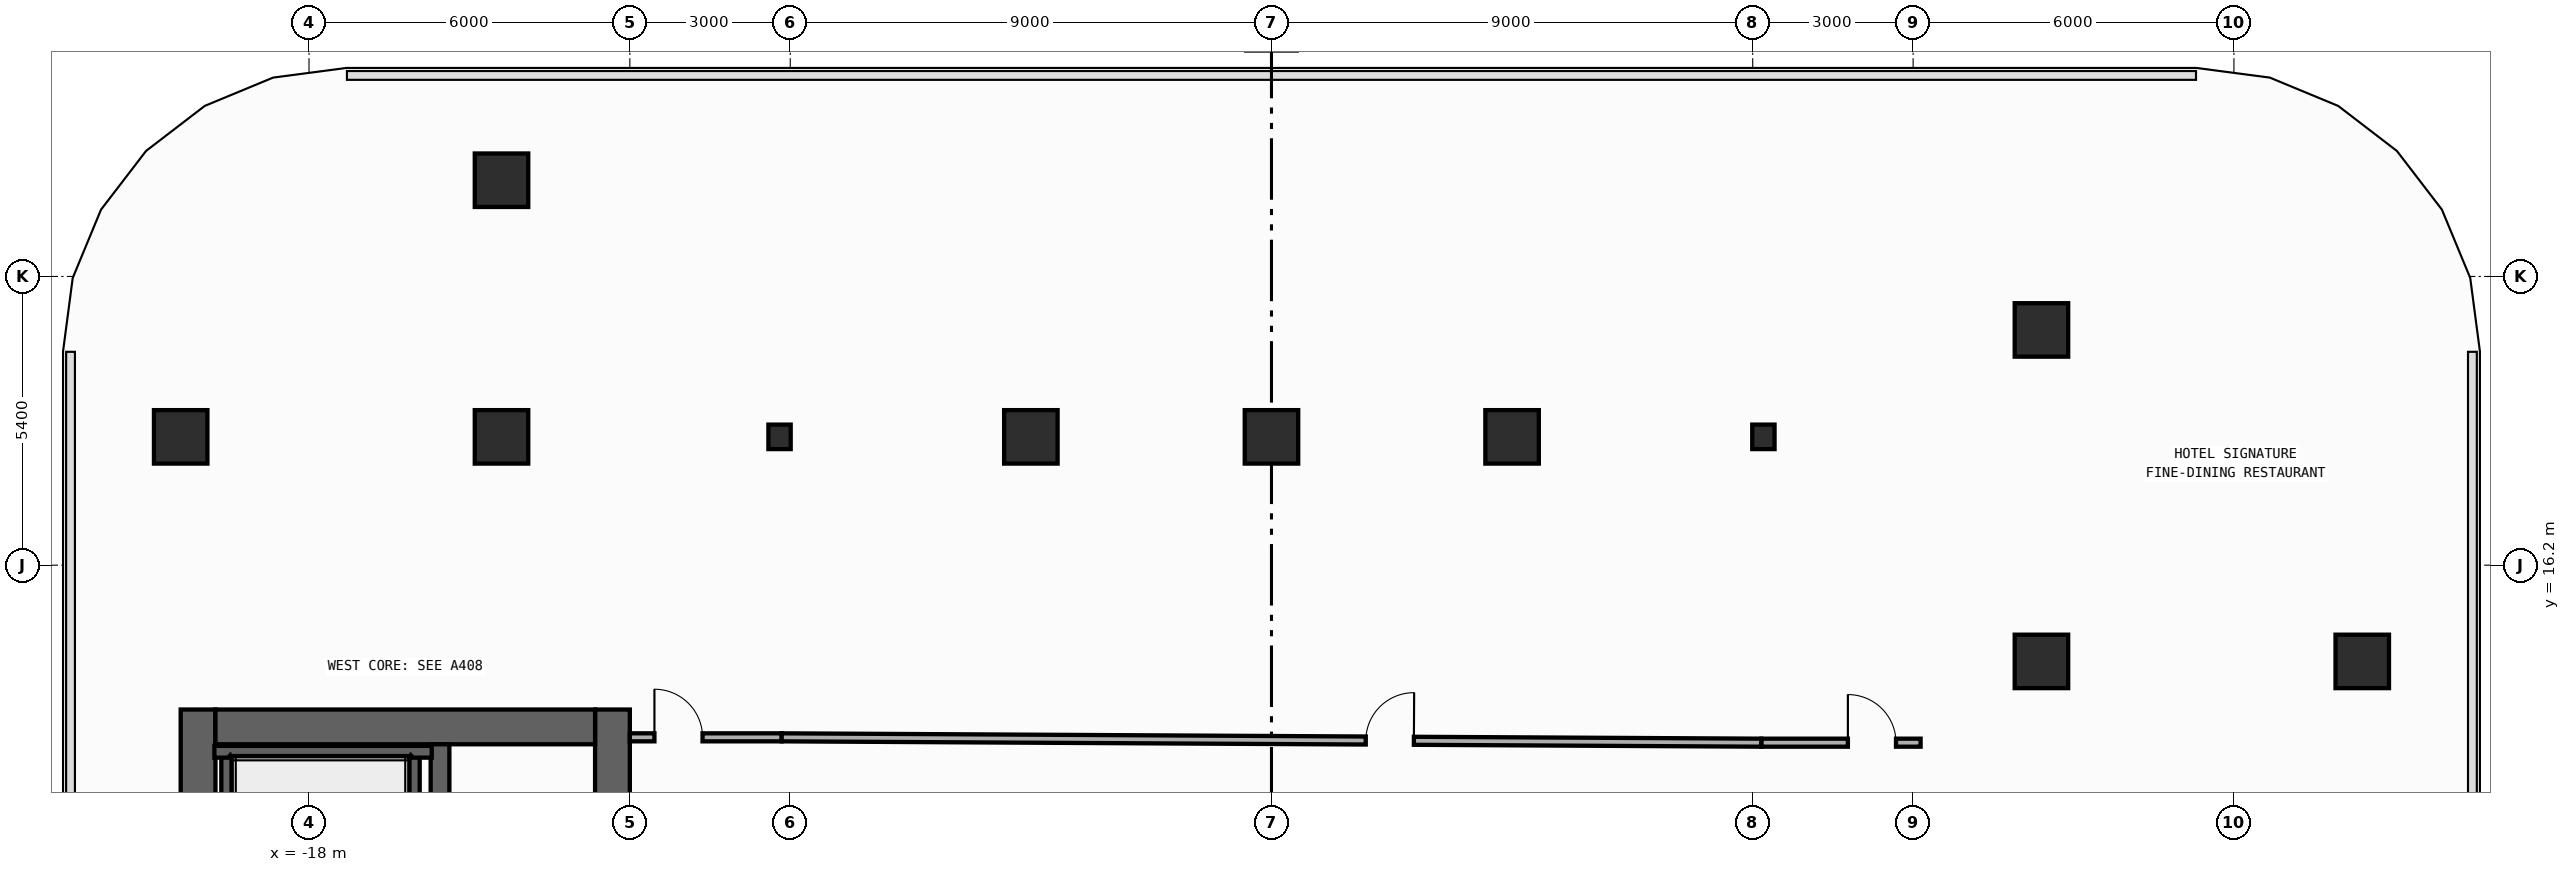
"""IFC4 building model, lengths in metres.
Left out: names, types, materials, properties, quantities, classifications, styles, units other than length and angle.
Written with IfcOpenShell. Run it as: python <this file> out.ifc"""

import sys

from ifc_helpers import new_model, si_unit, direction, frame, frame_2d, origin, origin_2d, place, context, subcontext, project, spatial, rectangle, i_section, extrude, element, fill, save


model = new_model("IFC4")
c1 = context("Model", 3, precision=1e-05, world=origin(), true_north=direction((0.0, 1.0)))
c2 = subcontext(c1, "Body", "Model", "MODEL_VIEW")
j1 = project(units=[si_unit("LENGTHUNIT", "METRE"), si_unit("PLANEANGLEUNIT", "RADIAN")], contexts=[c1])
p1 = place(None, origin())
s1 = spatial("IfcSite", under=j1, at=p1, CompositionType="ELEMENT")
p2 = place(p1, origin())
s2 = spatial("IfcBuilding", under=s1, at=p2, CompositionType="ELEMENT")
p3 = place(p2, frame((0.0, 0.0, 160.4)))
s3 = spatial("IfcBuildingStorey", under=s2, at=p3, CompositionType="ELEMENT", Elevation=160.4)
p4 = place(p3, frame((-20.075, -13.5, 0.0), z_axis=(0.0, 0.0, 1.0), x_axis=(0.0, 1.0, 0.0)))
e1 = element("IfcWall", 1, at=p4, inside=s3, PredefinedType="SHEAR", context=c2, shape_type="SweptSolid", body=[
    extrude(rectangle(XDim=27.0, YDim=0.65, at=frame_2d((13.5, 0.0))), origin(), (0.0, 0.0, 1.0), 4.34),
])
p5 = place(p3, frame((-12.325, -13.5, 0.0), z_axis=(0.0, 0.0, 1.0), x_axis=(0.0, 1.0, 0.0)))
e2 = element("IfcWall", 2, at=p5, inside=s3, PredefinedType="SHEAR", context=c2, shape_type="SweptSolid", body=[
    extrude(rectangle(XDim=27.0, YDim=0.65, at=frame_2d((13.5, 0.0))), origin(), (0.0, 0.0, 1.0), 4.34),
])
p6 = place(p5, frame((10.35, 0.0, 0.0)))
e3 = element("IfcOpeningElement", 3, at=p6, cuts=e2, PredefinedType="OPENING", context=c2, shape_type="SweptSolid", body=[
    extrude(rectangle(XDim=1.1, YDim=2.2, at=frame_2d((0.55, 1.1))), frame((0.0, 0.335, 0.0), z_axis=(0.0, -1.0, 0.0), x_axis=(1.0, 0.0, 0.0)), (0.0, 0.0, 1.0), 0.67),
])
p7 = place(p5, frame((7.15, 0.0, 0.0)))
e4 = element("IfcOpeningElement", 4, at=p7, cuts=e2, PredefinedType="OPENING", context=c2, shape_type="SweptSolid", body=[
    extrude(rectangle(XDim=1.1, YDim=2.2, at=frame_2d((0.55, 1.1))), frame((0.0, 0.335, 0.0), z_axis=(0.0, -1.0, 0.0), x_axis=(1.0, 0.0, 0.0)), (0.0, 0.0, 1.0), 0.67),
])
p8 = place(p5, frame((3.95, 0.0, 0.0)))
e5 = element("IfcOpeningElement", 5, at=p8, cuts=e2, PredefinedType="OPENING", context=c2, shape_type="SweptSolid", body=[
    extrude(rectangle(XDim=1.1, YDim=2.2, at=frame_2d((0.55, 1.1))), frame((0.0, 0.335, 0.0), z_axis=(0.0, -1.0, 0.0), x_axis=(1.0, 0.0, 0.0)), (0.0, 0.0, 1.0), 0.67),
])
p9 = place(p5, frame((15.175, 0.0, 0.0)))
e6 = element("IfcOpeningElement", 6, at=p9, cuts=e2, PredefinedType="OPENING", context=c2, shape_type="SweptSolid", body=[
    extrude(rectangle(XDim=0.85, YDim=2.1, at=frame_2d((0.425, 1.05))), frame((0.0, 0.335, 0.0), z_axis=(0.0, -1.0, 0.0), x_axis=(1.0, 0.0, 0.0)), (0.0, 0.0, 1.0), 0.67),
])
p10 = place(p5, frame((21.275, 0.0, 0.0)))
e7 = element("IfcOpeningElement", 7, at=p10, cuts=e2, PredefinedType="OPENING", context=c2, shape_type="SweptSolid", body=[
    extrude(rectangle(XDim=0.85, YDim=2.1, at=frame_2d((0.425, 1.05))), frame((0.0, 0.335, 0.0), z_axis=(0.0, -1.0, 0.0), x_axis=(1.0, 0.0, 0.0)), (0.0, 0.0, 1.0), 0.67),
])
p11 = place(p5, frame((12.725, 0.0, 0.0)))
e8 = element("IfcOpeningElement", 8, at=p11, cuts=e2, PredefinedType="OPENING", context=c2, shape_type="SweptSolid", body=[
    extrude(rectangle(XDim=1.15, YDim=2.2, at=frame_2d((0.575, 1.1))), frame((0.0, 0.335, 0.0), z_axis=(0.0, -1.0, 0.0), x_axis=(1.0, 0.0, 0.0)), (0.0, 0.0, 1.0), 0.67),
])
p12 = place(p5, frame((1.625, 0.0, 0.0)))
e9 = element("IfcOpeningElement", 9, at=p12, cuts=e2, PredefinedType="OPENING", context=c2, shape_type="SweptSolid", body=[
    extrude(rectangle(XDim=0.85, YDim=2.1, at=frame_2d((0.425, 1.05))), frame((0.0, 0.335, 0.0), z_axis=(0.0, -1.0, 0.0), x_axis=(1.0, 0.0, 0.0)), (0.0, 0.0, 1.0), 0.67),
])
p13 = place(p3, frame((-19.75, 13.175, 0.0), z_axis=(0.0, 0.0, 1.0), x_axis=(1.0, 0.0, 0.0)))
e10 = element("IfcWall", 10, at=p13, inside=s3, PredefinedType="SHEAR", context=c2, shape_type="SweptSolid", body=[
    extrude(rectangle(XDim=7.1, YDim=0.65, at=frame_2d((3.55, 0.0))), origin(), (0.0, 0.0, 1.0), 4.34),
])
p14 = place(p3, frame((-15.55, -12.85, 0.0), z_axis=(0.0, 0.0, 1.0), x_axis=(0.0, 1.0, 0.0)))
e11 = element("IfcWall", 11, at=p14, inside=s3, PredefinedType="SHEAR", context=c2, shape_type="SweptSolid", body=[
    extrude(rectangle(XDim=25.7, YDim=0.35, at=frame_2d((12.85, 0.0))), origin(), (0.0, 0.0, 1.0), 4.34),
])
p15 = place(p14, frame((12.075, 0.0, 0.0)))
e12 = element("IfcOpeningElement", 12, at=p15, cuts=e11, PredefinedType="OPENING", context=c2, shape_type="SweptSolid", body=[
    extrude(rectangle(XDim=1.15, YDim=2.2, at=frame_2d((0.575, 1.1))), frame((0.0, 0.185, 0.0), z_axis=(0.0, -1.0, 0.0), x_axis=(1.0, 0.0, 0.0)), (0.0, 0.0, 1.0), 0.37),
])
p16 = place(p14, frame((0.975, 0.0, 0.0)))
e13 = element("IfcOpeningElement", 13, at=p16, cuts=e11, PredefinedType="OPENING", context=c2, shape_type="SweptSolid", body=[
    extrude(rectangle(XDim=0.85, YDim=2.1, at=frame_2d((0.425, 1.05))), frame((0.0, 0.185, 0.0), z_axis=(0.0, -1.0, 0.0), x_axis=(1.0, 0.0, 0.0)), (0.0, 0.0, 1.0), 0.37),
])
for number, where, z_axis, x_axis in (
    (14, (-16.04, 1.29, 0.0), (0.0, 0.0, 1.0), (0.0, 1.0, 0.0)),
    (15, (-19.53, 1.29, 0.0), (0.0, 0.0, 1.0), (0.0, 1.0, 0.0)),
):
    element("IfcWall", number, at=place(p3, frame(where, z_axis=z_axis, x_axis=x_axis)), inside=s3, PredefinedType="SHEAR", context=c2, shape_type="SweptSolid", body=[
        extrude(rectangle(XDim=11.42, YDim=0.22, at=frame_2d((5.71, 0.0))), origin(), (0.0, 0.0, 1.0), 4.34),
    ])
p17 = place(p3, frame((-19.77, 12.71, 0.0), z_axis=(0.0, 0.0, 1.0), x_axis=(1.0, 0.0, 0.0)))
e16 = element("IfcWall", 16, at=p17, inside=s3, PredefinedType="SHEAR", context=c2, shape_type="SweptSolid", body=[
    extrude(rectangle(XDim=4.065, YDim=0.22, at=frame_2d((2.032, 0.0))), origin(), (0.0, 0.0, 1.0), 4.34),
])
for number, where, z_axis, x_axis in (
    (17, (-9.2, 18.6, 0.0), (0.0, 0.0, 1.0), (1.0, 0.0, 0.0)),
    (18, (9.2, 18.6, 0.0), (0.0, 0.0, 1.0), (1.0, 0.0, 0.0)),
):
    element("IfcColumn", number, at=place(p3, frame(where, z_axis=z_axis, x_axis=x_axis)), inside=s3, PredefinedType="COLUMN", context=c2, shape_type="SweptSolid", body=[
        extrude(i_section(OverallWidth=0.417, OverallDepth=0.458, WebThickness=0.03, FlangeThickness=0.05, FilletRadius=0.022, at=origin_2d()), origin(), (0.0, 0.0, 1.0), 4.6),
    ])
for number, where, z_axis, x_axis in (
    (19, (-20.4, 18.6, 0.0), (0.0, 0.0, 1.0), (1.0, 0.0, 0.0)),
    (20, (20.4, 14.4, 0.0), (0.0, 0.0, 1.0), (1.0, 0.0, 0.0)),
    (21, (-14.4, 18.6, 0.0), (0.0, 0.0, 1.0), (1.0, 0.0, 0.0)),
    (22, (14.4, 14.4, 0.0), (0.0, 0.0, 1.0), (1.0, 0.0, 0.0)),
    (23, (-4.5, 18.6, 0.0), (0.0, 0.0, 1.0), (1.0, 0.0, 0.0)),
    (24, (0.0, 18.6, 0.0), (0.0, 0.0, 1.0), (1.0, 0.0, 0.0)),
    (25, (4.5, 18.6, 0.0), (0.0, 0.0, 1.0), (1.0, 0.0, 0.0)),
    (26, (-14.4, 23.4, 0.0), (0.0, 0.0, 1.0), (1.0, 0.0, 0.0)),
    (27, (14.4, 20.6, 0.0), (0.0, 0.0, 1.0), (1.0, 0.0, 0.0)),
):
    element("IfcColumn", number, at=place(p3, frame(where, z_axis=z_axis, x_axis=x_axis)), inside=s3, PredefinedType="COLUMN", context=c2, shape_type="SweptSolid", body=[
        extrude(rectangle(XDim=1.0, YDim=1.0, at=origin_2d()), origin(), (0.0, 0.0, 1.0), 4.6),
    ])
p18 = place(p3, frame((-12.0, 12.98, 0.0), z_axis=(0.0, 0.0, 1.0), x_axis=(1.0, 0.0, 0.0)))
e28 = element("IfcWall", 28, at=p18, inside=s3, PredefinedType="PARTITIONING", context=c2, shape_type="SweptSolid", body=[
    extrude(rectangle(XDim=2.84, YDim=0.15, at=frame_2d((1.42, 0.0))), origin(), (0.0, 0.0, 1.0), 4.34),
])
p19 = place(p18, frame((0.46, 0.0, 0.0)))
e29 = element("IfcOpeningElement", 29, at=p19, cuts=e28, PredefinedType="OPENING", context=c2, shape_type="SweptSolid", body=[
    extrude(rectangle(XDim=0.9, YDim=2.15, at=frame_2d((0.45, 1.075))), frame((0.0, 0.085, 0.0), z_axis=(0.0, -1.0, 0.0), x_axis=(1.0, 0.0, 0.0)), (0.0, 0.0, 1.0), 0.17),
])
p20 = place(p3, frame((9.16, 12.88, 0.0), z_axis=(0.0, 0.0, 1.0), x_axis=(1.0, 0.0, 0.0)))
e30 = element("IfcWall", 30, at=p20, inside=s3, PredefinedType="PARTITIONING", context=c2, shape_type="SweptSolid", body=[
    extrude(rectangle(XDim=2.98, YDim=0.15, at=frame_2d((1.49, 0.0))), origin(), (0.0, 0.0, 1.0), 4.34),
])
p21 = place(p20, frame((1.62, 0.0, 0.0)))
e31 = element("IfcOpeningElement", 31, at=p21, cuts=e30, PredefinedType="OPENING", context=c2, shape_type="SweptSolid", body=[
    extrude(rectangle(XDim=0.9, YDim=2.15, at=frame_2d((0.45, 1.075))), frame((0.0, 0.085, 0.0), z_axis=(0.0, -1.0, 0.0), x_axis=(1.0, 0.0, 0.0)), (0.0, 0.0, 1.0), 0.17),
])
p22 = place(p3, frame((-9.16, 12.98, 0.0), z_axis=(0.0, 0.0, 1.0), x_axis=(0.999985073242, -0.005463816733, 0.0)))
e32 = element("IfcWall", 32, at=p22, inside=s3, PredefinedType="PARTITIONING", context=c2, shape_type="SweptSolid", body=[
    extrude(rectangle(XDim=18.32, YDim=0.15, at=frame_2d((9.16, 0.0))), origin(), (0.0, 0.0, 1.0), 4.34),
])
p23 = place(p22, frame((10.924, 0.0, 0.0)))
e33 = element("IfcOpeningElement", 33, at=p23, cuts=e32, PredefinedType="OPENING", context=c2, shape_type="SweptSolid", body=[
    extrude(rectangle(XDim=0.9, YDim=2.15, at=frame_2d((0.45, 1.075))), frame((0.0, 0.085, 0.0), z_axis=(0.0, -1.0, 0.0), x_axis=(1.0, 0.0, 0.0)), (0.0, 0.0, 1.0), 0.17),
])
p24 = place(p19, origin())
e34 = element("IfcDoor", 34, at=p24, inside=s3, OperationType="SINGLE_SWING_LEFT", PredefinedType="DOOR", context=c2, shape_type="SweptSolid", body=[
    extrude(rectangle(XDim=0.9, YDim=2.15, at=frame_2d((0.45, 1.075))), frame((0.0, 0.025, 0.0), z_axis=(0.0, -1.0, 0.0), x_axis=(1.0, 0.0, 0.0)), (0.0, 0.0, 1.0), 0.05),
])
fill(e29, e34)
p25 = place(p21, origin())
e35 = element("IfcDoor", 35, at=p25, inside=s3, OperationType="SINGLE_SWING_LEFT", PredefinedType="DOOR", context=c2, shape_type="SweptSolid", body=[
    extrude(rectangle(XDim=0.9, YDim=2.15, at=frame_2d((0.45, 1.075))), frame((0.0, 0.025, 0.0), z_axis=(0.0, -1.0, 0.0), x_axis=(1.0, 0.0, 0.0)), (0.0, 0.0, 1.0), 0.05),
])
fill(e31, e35)
p26 = place(p23, origin())
e36 = element("IfcDoor", 36, at=p26, inside=s3, OperationType="SINGLE_SWING_RIGHT", PredefinedType="DOOR", context=c2, shape_type="SweptSolid", body=[
    extrude(rectangle(XDim=0.9, YDim=2.15, at=frame_2d((0.45, 1.075))), frame((0.0, 0.025, 0.0), z_axis=(0.0, -1.0, 0.0), x_axis=(1.0, 0.0, 0.0)), (0.0, 0.0, 1.0), 0.05),
])
fill(e33, e36)
save(model, sys.argv[1])
